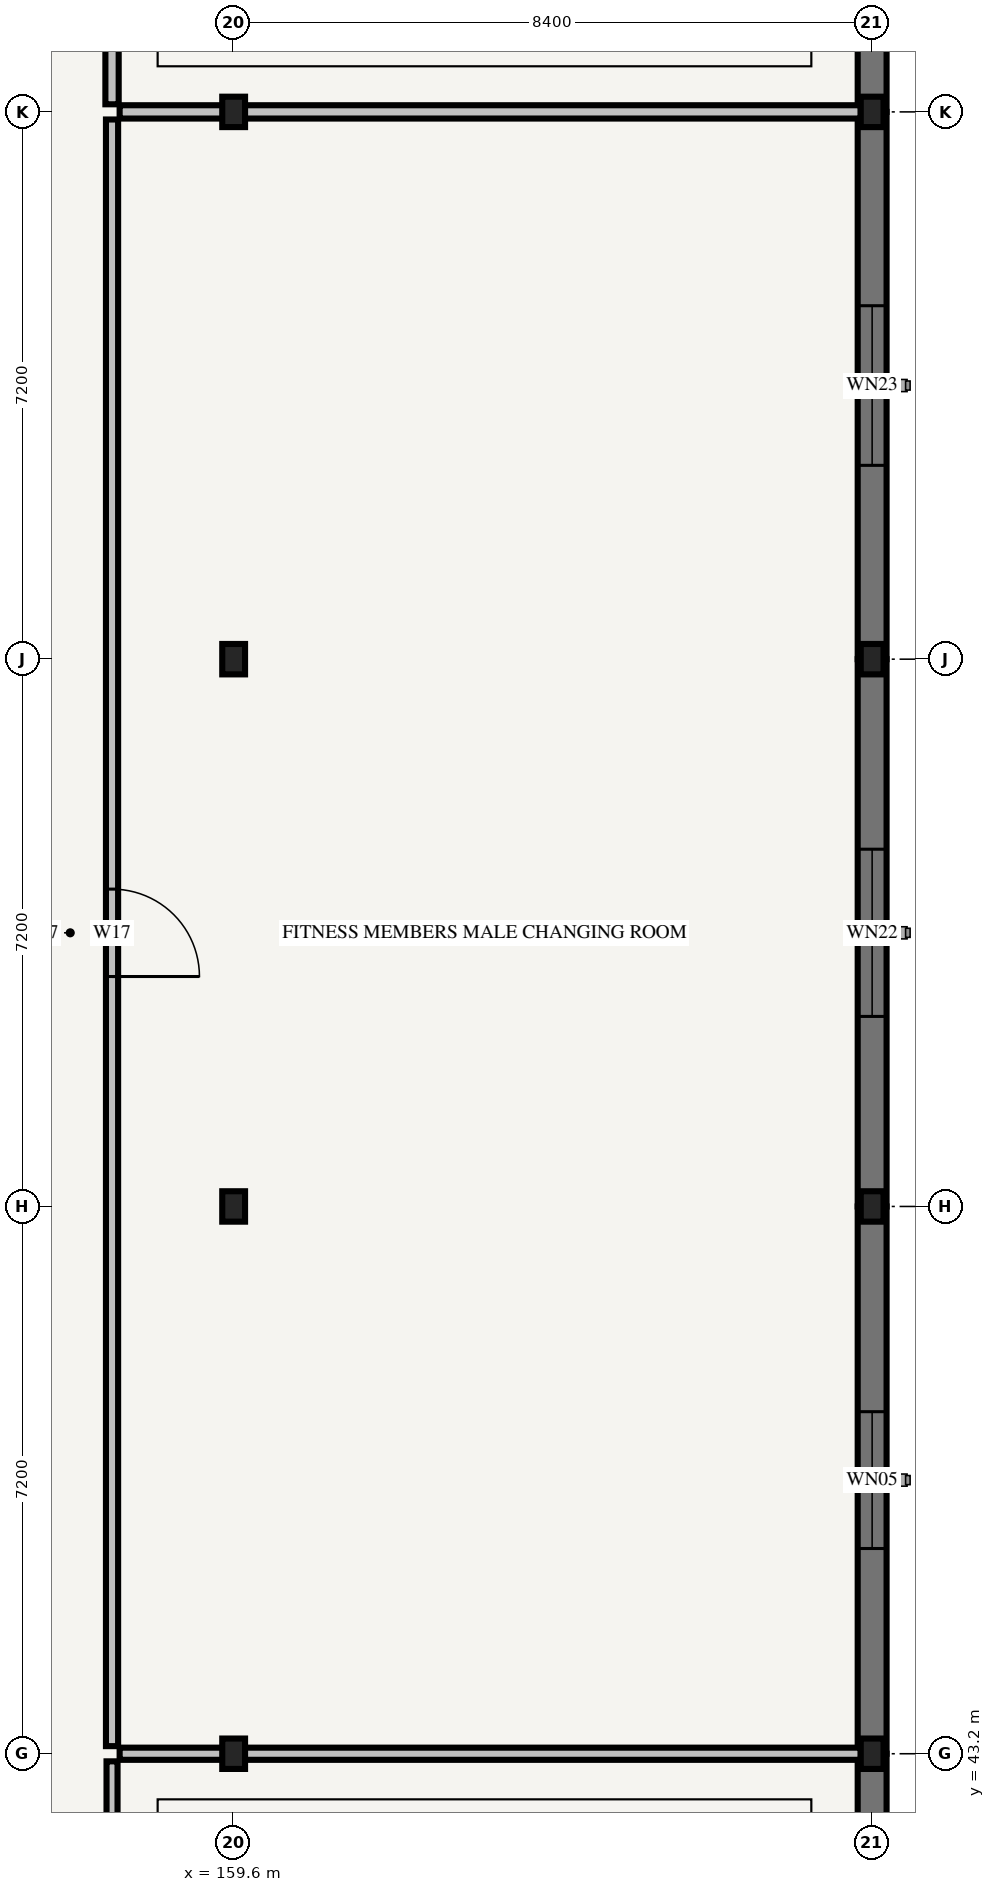
"""IFC4 building model, lengths in metres.
Left out: names, types, materials, properties, quantities, classifications, styles, units other than length and angle.
Written with IfcOpenShell. Run it as: python <this file> out.ifc"""

import sys

from ifc_helpers import new_model, si_unit, direction, frame, frame_2d, origin, origin_2d, place, context, subcontext, project, spatial, rectangle, i_section, extrude, element, fill, save


model = new_model("IFC4")
c1 = context("Model", 3, precision=1e-05, world=origin(), true_north=direction((0.0, 1.0)))
c2 = subcontext(c1, "Body", "Model", "MODEL_VIEW")
j1 = project(units=[si_unit("LENGTHUNIT", "METRE"), si_unit("PLANEANGLEUNIT", "RADIAN")], contexts=[c1])
p1 = place(None, origin())
s1 = spatial("IfcSite", under=j1, at=p1, CompositionType="ELEMENT")
p2 = place(p1, origin())
s2 = spatial("IfcBuilding", under=s1, at=p2, CompositionType="ELEMENT")
p3 = place(p2, frame((0.0, 0.0, 4.5)))
s3 = spatial("IfcBuildingStorey", under=s2, at=p3, CompositionType="ELEMENT", Elevation=4.5)
for number, where, z_axis, x_axis in (
    (1, (159.6, 43.2, 0.0), (0.0, 0.0, 1.0), (1.0, 0.0, 0.0)),
    (2, (159.6, 50.4, 0.0), (0.0, 0.0, 1.0), (1.0, 0.0, 0.0)),
    (3, (159.6, 57.6, 0.0), (0.0, 0.0, 1.0), (1.0, 0.0, 0.0)),
    (4, (159.6, 64.8, 0.0), (0.0, 0.0, 1.0), (1.0, 0.0, 0.0)),
    (5, (168.0, 43.2, 0.0), (0.0, 0.0, 1.0), (1.0, 0.0, 0.0)),
    (6, (168.0, 50.4, 0.0), (0.0, 0.0, 1.0), (1.0, 0.0, 0.0)),
    (7, (168.0, 57.6, 0.0), (0.0, 0.0, 1.0), (1.0, 0.0, 0.0)),
    (8, (168.0, 64.8, 0.0), (0.0, 0.0, 1.0), (1.0, 0.0, 0.0)),
):
    element("IfcColumn", number, at=place(p3, frame(where, z_axis=z_axis, x_axis=x_axis)), inside=s3, PredefinedType="COLUMN", context=c2, shape_type="SweptSolid", body=[
        extrude(i_section(OverallWidth=0.3, OverallDepth=0.4, WebThickness=0.013, FlangeThickness=0.024, FilletRadius=0.027, at=origin_2d()), origin(), (0.0, 0.0, 1.0), 4.2),
    ])
p4 = place(p3, frame((168.0, 36.0, 0.0), z_axis=(0.0, 0.0, 1.0), x_axis=(0.0, 1.0, 0.0)))
e9 = element("IfcWall", 9, at=p4, inside=s3, PredefinedType="SOLIDWALL", context=c2, shape_type="SweptSolid", body=[
    extrude(rectangle(XDim=7.2, YDim=0.38, at=frame_2d((3.6, 0.0))), origin(), (0.0, 0.0, 1.0), 3.435),
])
p5 = place(p4, frame((2.6, 0.0, 0.85)))
e10 = element("IfcOpeningElement", 10, at=p5, cuts=e9, PredefinedType="OPENING", context=c2, shape_type="SweptSolid", body=[
    extrude(rectangle(XDim=2.0, YDim=1.6, at=frame_2d((1.0, 0.8))), frame((0.0, 0.215, 0.0), z_axis=(0.0, -1.0, 0.0), x_axis=(1.0, 0.0, 0.0)), (0.0, 0.0, 1.0), 0.43),
])
p6 = place(p3, frame((168.0, 43.2, 0.0), z_axis=(0.0, 0.0, 1.0), x_axis=(0.0, 1.0, 0.0)))
e11 = element("IfcWall", 11, at=p6, inside=s3, PredefinedType="SOLIDWALL", context=c2, shape_type="SweptSolid", body=[
    extrude(rectangle(XDim=7.2, YDim=0.38, at=frame_2d((3.6, 0.0))), origin(), (0.0, 0.0, 1.0), 3.485),
])
p7 = place(p6, frame((2.7, 0.0, 0.85)))
e12 = element("IfcOpeningElement", 12, at=p7, cuts=e11, PredefinedType="OPENING", context=c2, shape_type="SweptSolid", body=[
    extrude(rectangle(XDim=1.8, YDim=1.8, at=frame_2d((0.9, 0.9))), frame((0.0, 0.215, 0.0), z_axis=(0.0, -1.0, 0.0), x_axis=(1.0, 0.0, 0.0)), (0.0, 0.0, 1.0), 0.43),
])
p8 = place(p3, frame((168.0, 50.4, 0.0), z_axis=(0.0, 0.0, 1.0), x_axis=(0.0, 1.0, 0.0)))
e13 = element("IfcWall", 13, at=p8, inside=s3, PredefinedType="SOLIDWALL", context=c2, shape_type="SweptSolid", body=[
    extrude(rectangle(XDim=7.2, YDim=0.38, at=frame_2d((3.6, 0.0))), origin(), (0.0, 0.0, 1.0), 3.385),
])
p9 = place(p8, frame((2.5, 0.0, 0.85)))
e14 = element("IfcOpeningElement", 14, at=p9, cuts=e13, PredefinedType="OPENING", context=c2, shape_type="SweptSolid", body=[
    extrude(rectangle(XDim=2.2, YDim=1.55, at=frame_2d((1.1, 0.775))), frame((0.0, 0.215, 0.0), z_axis=(0.0, -1.0, 0.0), x_axis=(1.0, 0.0, 0.0)), (0.0, 0.0, 1.0), 0.43),
])
p10 = place(p3, frame((168.0, 57.6, 0.0), z_axis=(0.0, 0.0, 1.0), x_axis=(0.0, 1.0, 0.0)))
e15 = element("IfcWall", 15, at=p10, inside=s3, PredefinedType="SOLIDWALL", context=c2, shape_type="SweptSolid", body=[
    extrude(rectangle(XDim=7.2, YDim=0.38, at=frame_2d((3.6, 0.0))), origin(), (0.0, 0.0, 1.0), 3.385),
])
p11 = place(p10, frame((2.55, 0.0, 0.85)))
e16 = element("IfcOpeningElement", 16, at=p11, cuts=e15, PredefinedType="OPENING", context=c2, shape_type="SweptSolid", body=[
    extrude(rectangle(XDim=2.1, YDim=1.45, at=frame_2d((1.05, 0.725))), frame((0.0, 0.215, 0.0), z_axis=(0.0, -1.0, 0.0), x_axis=(1.0, 0.0, 0.0)), (0.0, 0.0, 1.0), 0.43),
])
p12 = place(p3, frame((168.0, 64.8, 0.0), z_axis=(0.0, 0.0, 1.0), x_axis=(0.0, 1.0, 0.0)))
e17 = element("IfcWall", 17, at=p12, inside=s3, PredefinedType="SOLIDWALL", context=c2, shape_type="SweptSolid", body=[
    extrude(rectangle(XDim=7.2, YDim=0.38, at=frame_2d((3.6, 0.0))), origin(), (0.0, 0.0, 1.0), 3.435),
])
p13 = place(p3, frame((158.0, 21.6, 0.0), z_axis=(0.0, 0.0, 1.0), x_axis=(0.0, 1.0, 0.0)))
e18 = element("IfcWall", 18, at=p13, inside=s3, PredefinedType="PARTITIONING", context=c2, shape_type="SweptSolid", body=[
    extrude(rectangle(XDim=21.5, YDim=0.145, at=frame_2d((10.75, 0.0))), origin(), (0.0, 0.0, 1.0), 3.32),
])
p14 = place(p13, frame((10.075, 0.0, 0.0)))
e19 = element("IfcOpeningElement", 19, at=p14, cuts=e18, PredefinedType="OPENING", context=c2, shape_type="SweptSolid", body=[
    extrude(rectangle(XDim=1.35, YDim=2.2, at=frame_2d((0.675, 1.1))), frame((0.0, 0.097, 0.0), z_axis=(0.0, -1.0, 0.0), x_axis=(1.0, 0.0, 0.0)), (0.0, 0.0, 1.0), 0.195),
])
p15 = place(p3, frame((158.0, 43.3, 0.0), z_axis=(0.0, 0.0, 1.0), x_axis=(0.0, 1.0, 0.0)))
e20 = element("IfcWall", 20, at=p15, inside=s3, PredefinedType="PARTITIONING", context=c2, shape_type="SweptSolid", body=[
    extrude(rectangle(XDim=21.4, YDim=0.16, at=frame_2d((10.7, 0.0))), origin(), (0.0, 0.0, 1.0), 3.32),
])
p16 = place(p15, frame((10.125, 0.0, 0.0)))
e21 = element("IfcOpeningElement", 21, at=p16, cuts=e20, PredefinedType="OPENING", context=c2, shape_type="SweptSolid", body=[
    extrude(rectangle(XDim=1.15, YDim=2.15, at=frame_2d((0.575, 1.075))), frame((0.0, 0.105, 0.0), z_axis=(0.0, -1.0, 0.0), x_axis=(1.0, 0.0, 0.0)), (0.0, 0.0, 1.0), 0.21),
])
p17 = place(p3, frame((158.1, 43.2, 0.0), z_axis=(0.0, 0.0, 1.0), x_axis=(1.0, 0.0, 0.0)))
e22 = element("IfcWall", 22, at=p17, inside=s3, PredefinedType="PARTITIONING", context=c2, shape_type="SweptSolid", body=[
    extrude(rectangle(XDim=9.75, YDim=0.16, at=frame_2d((4.875, 0.0))), origin(), (0.0, 0.0, 1.0), 3.32),
])
p18 = place(p3, frame((158.0, 64.9, 0.0), z_axis=(0.0, 0.0, 1.0), x_axis=(0.0, 1.0, 0.0)))
e23 = element("IfcWall", 23, at=p18, inside=s3, PredefinedType="PARTITIONING", context=c2, shape_type="SweptSolid", body=[
    extrude(rectangle(XDim=21.4, YDim=0.175, at=frame_2d((10.7, 0.0))), origin(), (0.0, 0.0, 1.0), 3.32),
])
p19 = place(p18, frame((9.95, 0.0, 0.0)))
e24 = element("IfcOpeningElement", 24, at=p19, cuts=e23, PredefinedType="OPENING", context=c2, shape_type="SweptSolid", body=[
    extrude(rectangle(XDim=1.5, YDim=2.2, at=frame_2d((0.75, 1.1))), frame((0.0, 0.112, 0.0), z_axis=(0.0, -1.0, 0.0), x_axis=(1.0, 0.0, 0.0)), (0.0, 0.0, 1.0), 0.225),
])
p20 = place(p3, frame((158.1, 64.8, 0.0), z_axis=(0.0, 0.0, 1.0), x_axis=(1.0, 0.0, 0.0)))
e25 = element("IfcWall", 25, at=p20, inside=s3, PredefinedType="PARTITIONING", context=c2, shape_type="SweptSolid", body=[
    extrude(rectangle(XDim=9.75, YDim=0.175, at=frame_2d((4.875, 0.0))), origin(), (0.0, 0.0, 1.0), 3.32),
])
p21 = place(p7, origin())
e26 = element("IfcWindow", 26, at=p21, inside=s3, PartitioningType="SINGLE_PANEL", PredefinedType="WINDOW", context=c2, shape_type="SweptSolid", body=[
    extrude(rectangle(XDim=1.8, YDim=1.8, at=frame_2d((0.9, 0.9))), frame((0.0, 0.03, 0.0), z_axis=(0.0, -1.0, 0.0), x_axis=(1.0, 0.0, 0.0)), (0.0, 0.0, 1.0), 0.06),
])
fill(e12, e26)
p22 = place(p9, origin())
e27 = element("IfcWindow", 27, at=p22, inside=s3, PartitioningType="SINGLE_PANEL", PredefinedType="WINDOW", context=c2, shape_type="SweptSolid", body=[
    extrude(rectangle(XDim=2.2, YDim=1.55, at=frame_2d((1.1, 0.775))), frame((0.0, 0.03, 0.0), z_axis=(0.0, -1.0, 0.0), x_axis=(1.0, 0.0, 0.0)), (0.0, 0.0, 1.0), 0.06),
])
fill(e14, e27)
p23 = place(p11, origin())
e28 = element("IfcWindow", 28, at=p23, inside=s3, PartitioningType="SINGLE_PANEL", PredefinedType="WINDOW", context=c2, shape_type="SweptSolid", body=[
    extrude(rectangle(XDim=2.1, YDim=1.45, at=frame_2d((1.05, 0.725))), frame((0.0, 0.03, 0.0), z_axis=(0.0, -1.0, 0.0), x_axis=(1.0, 0.0, 0.0)), (0.0, 0.0, 1.0), 0.06),
])
fill(e16, e28)
p24 = place(p16, origin())
e29 = element("IfcDoor", 29, at=p24, inside=s3, OperationType="SINGLE_SWING_RIGHT", PredefinedType="DOOR", context=c2, shape_type="SweptSolid", body=[
    extrude(rectangle(XDim=1.15, YDim=2.15, at=frame_2d((0.575, 1.075))), frame((0.0, 0.025, 0.0), z_axis=(0.0, -1.0, 0.0), x_axis=(1.0, 0.0, 0.0)), (0.0, 0.0, 1.0), 0.05),
])
fill(e21, e29)
save(model, sys.argv[1])
